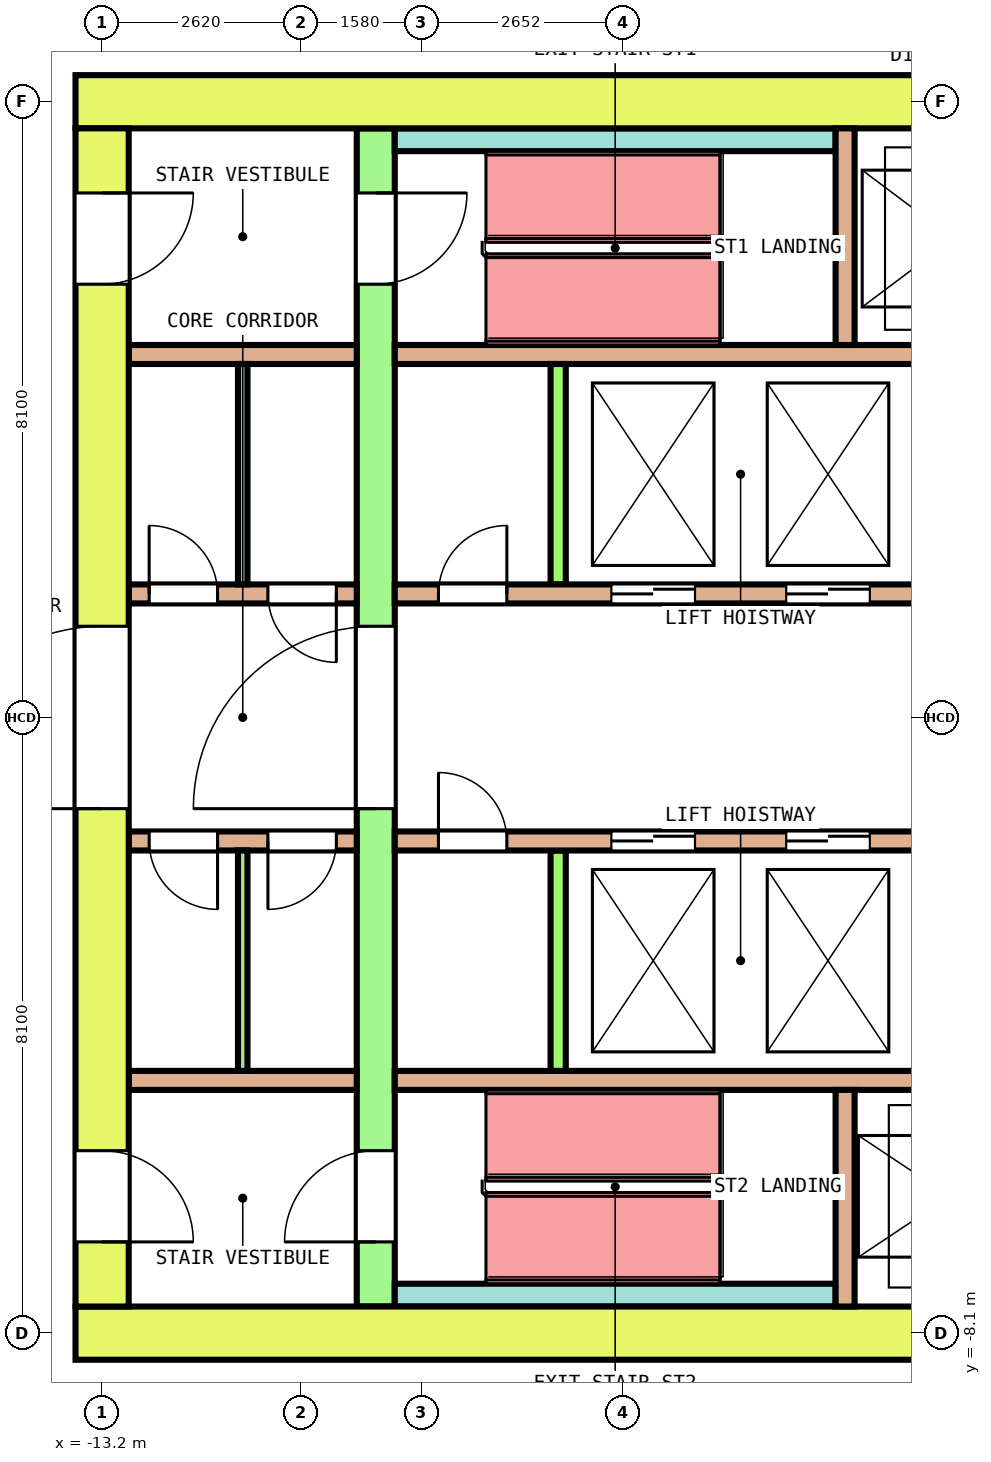
"""IFC4 building model, lengths in metres.
Left out: names, types, materials, properties, quantities, classifications, styles, units other than length and angle.
Written with IfcOpenShell. Run it as: python <this file> out.ifc"""

import sys

from ifc_helpers import new_model, si_unit, direction, frame, frame_2d, origin, place, context, subcontext, project, spatial, rectangle, extrude, element, fill, save


model = new_model("IFC4")
c1 = context("Model", 3, precision=1e-05, world=origin(), true_north=direction((0.0, 1.0)))
c2 = subcontext(c1, "Body", "Model", "MODEL_VIEW")
j1 = project(units=[si_unit("LENGTHUNIT", "METRE"), si_unit("PLANEANGLEUNIT", "RADIAN")], contexts=[c1])
p1 = place(None, origin())
s1 = spatial("IfcSite", under=j1, at=p1, CompositionType="ELEMENT")
p2 = place(p1, origin())
s2 = spatial("IfcBuilding", under=s1, at=p2, CompositionType="ELEMENT")
p3 = place(p2, frame((0.0, 0.0, 189.2)))
s3 = spatial("IfcBuildingStorey", under=s2, at=p3, CompositionType="ELEMENT", Elevation=189.2)
p4 = place(p3, frame((-13.55, 8.1, 0.0), z_axis=(0.0, 0.0, 1.0), x_axis=(1.0, 0.0, 0.0)))
e1 = element("IfcWall", 1, at=p4, inside=s3, PredefinedType="SHEAR", context=c2, shape_type="SweptSolid", body=[
    extrude(rectangle(XDim=27.1, YDim=0.7, at=frame_2d((13.55, 0.0))), origin(), (0.0, 0.0, 1.0), 4.1),
])
p5 = place(p4, frame((14.475, 0.0, 0.0)))
e2 = element("IfcOpeningElement", 2, at=p5, cuts=e1, PredefinedType="OPENING", context=c2, shape_type="SweptSolid", body=[
    extrude(rectangle(XDim=1.4, YDim=2.1, at=frame_2d((0.7, 1.05))), frame((0.0, 0.36, 0.0), z_axis=(0.0, -1.0, 0.0), x_axis=(1.0, 0.0, 0.0)), (0.0, 0.0, 1.0), 0.72),
])
p6 = place(p3, frame((-13.55, -8.1, 0.0), z_axis=(0.0, 0.0, 1.0), x_axis=(1.0, 0.0, 0.0)))
e3 = element("IfcWall", 3, at=p6, inside=s3, PredefinedType="SHEAR", context=c2, shape_type="SweptSolid", body=[
    extrude(rectangle(XDim=27.1, YDim=0.7, at=frame_2d((13.55, 0.0))), origin(), (0.0, 0.0, 1.0), 4.1),
])
p7 = place(p6, frame((15.1, 0.0, 0.0)))
e4 = element("IfcOpeningElement", 4, at=p7, cuts=e3, PredefinedType="OPENING", context=c2, shape_type="SweptSolid", body=[
    extrude(rectangle(XDim=1.2, YDim=2.1, at=frame_2d((0.6, 1.05))), frame((0.0, 0.36, 0.0), z_axis=(0.0, -1.0, 0.0), x_axis=(1.0, 0.0, 0.0)), (0.0, 0.0, 1.0), 0.72),
])
p8 = place(p3, frame((-13.2, -7.75, 0.0), z_axis=(0.0, 0.0, 1.0), x_axis=(0.0, 1.0, 0.0)))
e5 = element("IfcWall", 5, at=p8, inside=s3, PredefinedType="SHEAR", context=c2, shape_type="SweptSolid", body=[
    extrude(rectangle(XDim=15.5, YDim=0.7, at=frame_2d((7.75, 0.0))), origin(), (0.0, 0.0, 1.0), 4.1),
])
p9 = place(p8, frame((6.55, 0.0, 0.0)))
e6 = element("IfcOpeningElement", 6, at=p9, cuts=e5, PredefinedType="OPENING", context=c2, shape_type="SweptSolid", body=[
    extrude(rectangle(XDim=2.4, YDim=2.1, at=frame_2d((1.2, 1.05))), frame((0.0, 0.36, 0.0), z_axis=(0.0, -1.0, 0.0), x_axis=(1.0, 0.0, 0.0)), (0.0, 0.0, 1.0), 0.72),
])
p10 = place(p8, frame((13.45, 0.0, 0.0)))
e7 = element("IfcOpeningElement", 7, at=p10, cuts=e5, PredefinedType="OPENING", context=c2, shape_type="SweptSolid", body=[
    extrude(rectangle(XDim=1.2, YDim=2.1, at=frame_2d((0.6, 1.05))), frame((0.0, 0.36, 0.0), z_axis=(0.0, -1.0, 0.0), x_axis=(1.0, 0.0, 0.0)), (0.0, 0.0, 1.0), 0.72),
])
p11 = place(p8, frame((0.85, 0.0, 0.0)))
e8 = element("IfcOpeningElement", 8, at=p11, cuts=e5, PredefinedType="OPENING", context=c2, shape_type="SweptSolid", body=[
    extrude(rectangle(XDim=1.2, YDim=2.1, at=frame_2d((0.6, 1.05))), frame((0.0, 0.36, 0.0), z_axis=(0.0, -1.0, 0.0), x_axis=(1.0, 0.0, 0.0)), (0.0, 0.0, 1.0), 0.72),
])
p12 = place(p3, frame((-9.6, -7.75, 0.0), z_axis=(0.0, 0.0, 1.0), x_axis=(0.0, 1.0, 0.0)))
e9 = element("IfcWall", 9, at=p12, inside=s3, PredefinedType="SHEAR", context=c2, shape_type="SweptSolid", body=[
    extrude(rectangle(XDim=15.5, YDim=0.5, at=frame_2d((7.75, 0.0))), origin(), (0.0, 0.0, 1.0), 4.1),
])
p13 = place(p12, frame((6.55, 0.0, 0.0)))
e10 = element("IfcOpeningElement", 10, at=p13, cuts=e9, PredefinedType="OPENING", context=c2, shape_type="SweptSolid", body=[
    extrude(rectangle(XDim=2.4, YDim=2.1, at=frame_2d((1.2, 1.05))), frame((0.0, 0.26, 0.0), z_axis=(0.0, -1.0, 0.0), x_axis=(1.0, 0.0, 0.0)), (0.0, 0.0, 1.0), 0.52),
])
p14 = place(p12, frame((13.45, 0.0, 0.0)))
e11 = element("IfcOpeningElement", 11, at=p14, cuts=e9, PredefinedType="OPENING", context=c2, shape_type="SweptSolid", body=[
    extrude(rectangle(XDim=1.2, YDim=2.1, at=frame_2d((0.6, 1.05))), frame((0.0, 0.26, 0.0), z_axis=(0.0, -1.0, 0.0), x_axis=(1.0, 0.0, 0.0)), (0.0, 0.0, 1.0), 0.52),
])
p15 = place(p12, frame((0.85, 0.0, 0.0)))
e12 = element("IfcOpeningElement", 12, at=p15, cuts=e9, PredefinedType="OPENING", context=c2, shape_type="SweptSolid", body=[
    extrude(rectangle(XDim=1.2, YDim=2.1, at=frame_2d((0.6, 1.05))), frame((0.0, 0.26, 0.0), z_axis=(0.0, -1.0, 0.0), x_axis=(1.0, 0.0, 0.0)), (0.0, 0.0, 1.0), 0.52),
])
p16 = place(p3, frame((-12.85, 1.625, 0.0), z_axis=(0.0, 0.0, 1.0), x_axis=(1.0, 0.0, 0.0)))
e13 = element("IfcWall", 13, at=p16, inside=s3, PredefinedType="SOLIDWALL", context=c2, shape_type="SweptSolid", body=[
    extrude(rectangle(XDim=3.0, YDim=0.25, at=frame_2d((1.5, 0.0))), origin(), (0.0, 0.0, 1.0), 4.1),
])
p17 = place(p16, frame((0.269, 0.0, 0.0)))
e14 = element("IfcOpeningElement", 14, at=p17, cuts=e13, PredefinedType="OPENING", context=c2, shape_type="SweptSolid", body=[
    extrude(rectangle(XDim=0.9, YDim=2.1, at=frame_2d((0.45, 1.05))), frame((0.0, 0.135, 0.0), z_axis=(0.0, -1.0, 0.0), x_axis=(1.0, 0.0, 0.0)), (0.0, 0.0, 1.0), 0.27),
])
p18 = place(p16, frame((1.831, 0.0, 0.0)))
e15 = element("IfcOpeningElement", 15, at=p18, cuts=e13, PredefinedType="OPENING", context=c2, shape_type="SweptSolid", body=[
    extrude(rectangle(XDim=0.9, YDim=2.1, at=frame_2d((0.45, 1.05))), frame((0.0, 0.135, 0.0), z_axis=(0.0, -1.0, 0.0), x_axis=(1.0, 0.0, 0.0)), (0.0, 0.0, 1.0), 0.27),
])
p19 = place(p3, frame((-9.35, 1.625, 0.0), z_axis=(0.0, 0.0, 1.0), x_axis=(1.0, 0.0, 0.0)))
e16 = element("IfcWall", 16, at=p19, inside=s3, PredefinedType="SOLIDWALL", context=c2, shape_type="SweptSolid", body=[
    extrude(rectangle(XDim=18.7, YDim=0.25, at=frame_2d((9.35, 0.0))), origin(), (0.0, 0.0, 1.0), 4.1),
])
p20 = place(p19, frame((2.85, 0.0, 0.0)))
e17 = element("IfcOpeningElement", 17, at=p20, cuts=e16, PredefinedType="OPENING", context=c2, shape_type="SweptSolid", body=[
    extrude(rectangle(XDim=1.1, YDim=2.1, at=frame_2d((0.55, 1.05))), frame((0.0, 0.135, 0.0), z_axis=(0.0, -1.0, 0.0), x_axis=(1.0, 0.0, 0.0)), (0.0, 0.0, 1.0), 0.27),
])
p21 = place(p19, frame((5.15, 0.0, 0.0)))
e18 = element("IfcOpeningElement", 18, at=p21, cuts=e16, PredefinedType="OPENING", context=c2, shape_type="SweptSolid", body=[
    extrude(rectangle(XDim=1.1, YDim=2.1, at=frame_2d((0.55, 1.05))), frame((0.0, 0.135, 0.0), z_axis=(0.0, -1.0, 0.0), x_axis=(1.0, 0.0, 0.0)), (0.0, 0.0, 1.0), 0.27),
])
p22 = place(p19, frame((14.8, 0.0, 0.0)))
e19 = element("IfcOpeningElement", 19, at=p22, cuts=e16, PredefinedType="OPENING", context=c2, shape_type="SweptSolid", body=[
    extrude(rectangle(XDim=1.1, YDim=2.1, at=frame_2d((0.55, 1.05))), frame((0.0, 0.135, 0.0), z_axis=(0.0, -1.0, 0.0), x_axis=(1.0, 0.0, 0.0)), (0.0, 0.0, 1.0), 0.27),
])
p23 = place(p19, frame((0.575, 0.0, 0.0)))
e20 = element("IfcOpeningElement", 20, at=p23, cuts=e16, PredefinedType="OPENING", context=c2, shape_type="SweptSolid", body=[
    extrude(rectangle(XDim=0.9, YDim=2.1, at=frame_2d((0.45, 1.05))), frame((0.0, 0.135, 0.0), z_axis=(0.0, -1.0, 0.0), x_axis=(1.0, 0.0, 0.0)), (0.0, 0.0, 1.0), 0.27),
])
p24 = place(p19, frame((17.225, 0.0, 0.0)))
e21 = element("IfcOpeningElement", 21, at=p24, cuts=e16, PredefinedType="OPENING", context=c2, shape_type="SweptSolid", body=[
    extrude(rectangle(XDim=0.9, YDim=2.1, at=frame_2d((0.45, 1.05))), frame((0.0, 0.135, 0.0), z_axis=(0.0, -1.0, 0.0), x_axis=(1.0, 0.0, 0.0)), (0.0, 0.0, 1.0), 0.27),
])
p25 = place(p3, frame((-12.85, 4.775, 0.0), z_axis=(0.0, 0.0, 1.0), x_axis=(1.0, 0.0, 0.0)))
e22 = element("IfcWall", 22, at=p25, inside=s3, PredefinedType="SOLIDWALL", context=c2, shape_type="SweptSolid", body=[
    extrude(rectangle(XDim=3.0, YDim=0.25, at=frame_2d((1.5, 0.0))), origin(), (0.0, 0.0, 1.0), 4.1),
])
p26 = place(p3, frame((-9.35, 4.775, 0.0), z_axis=(0.0, 0.0, 1.0), x_axis=(1.0, 0.0, 0.0)))
e23 = element("IfcWall", 23, at=p26, inside=s3, PredefinedType="SOLIDWALL", context=c2, shape_type="SweptSolid", body=[
    extrude(rectangle(XDim=18.7, YDim=0.25, at=frame_2d((9.35, 0.0))), origin(), (0.0, 0.0, 1.0), 4.1),
])
p27 = place(p3, frame((-7.2, 1.75, 0.0), z_axis=(0.0, 0.0, 1.0), x_axis=(0.0, 1.0, 0.0)))
e24 = element("IfcWall", 24, at=p27, inside=s3, PredefinedType="SOLIDWALL", context=c2, shape_type="SweptSolid", body=[
    extrude(rectangle(XDim=2.9, YDim=0.2, at=frame_2d((1.45, 0.0))), origin(), (0.0, 0.0, 1.0), 4.1),
])
p28 = place(p3, frame((-12.85, -1.625, 0.0), z_axis=(0.0, 0.0, 1.0), x_axis=(1.0, 0.0, 0.0)))
e25 = element("IfcWall", 25, at=p28, inside=s3, PredefinedType="SOLIDWALL", context=c2, shape_type="SweptSolid", body=[
    extrude(rectangle(XDim=3.0, YDim=0.25, at=frame_2d((1.5, 0.0))), origin(), (0.0, 0.0, 1.0), 4.1),
])
p29 = place(p28, frame((0.269, 0.0, 0.0)))
e26 = element("IfcOpeningElement", 26, at=p29, cuts=e25, PredefinedType="OPENING", context=c2, shape_type="SweptSolid", body=[
    extrude(rectangle(XDim=0.9, YDim=2.1, at=frame_2d((0.45, 1.05))), frame((0.0, 0.135, 0.0), z_axis=(0.0, -1.0, 0.0), x_axis=(1.0, 0.0, 0.0)), (0.0, 0.0, 1.0), 0.27),
])
p30 = place(p28, frame((1.831, 0.0, 0.0)))
e27 = element("IfcOpeningElement", 27, at=p30, cuts=e25, PredefinedType="OPENING", context=c2, shape_type="SweptSolid", body=[
    extrude(rectangle(XDim=0.9, YDim=2.1, at=frame_2d((0.45, 1.05))), frame((0.0, 0.135, 0.0), z_axis=(0.0, -1.0, 0.0), x_axis=(1.0, 0.0, 0.0)), (0.0, 0.0, 1.0), 0.27),
])
p31 = place(p3, frame((-9.35, -1.625, 0.0), z_axis=(0.0, 0.0, 1.0), x_axis=(1.0, 0.0, 0.0)))
e28 = element("IfcWall", 28, at=p31, inside=s3, PredefinedType="SOLIDWALL", context=c2, shape_type="SweptSolid", body=[
    extrude(rectangle(XDim=18.7, YDim=0.25, at=frame_2d((9.35, 0.0))), origin(), (0.0, 0.0, 1.0), 4.1),
])
p32 = place(p31, frame((2.85, 0.0, 0.0)))
e29 = element("IfcOpeningElement", 29, at=p32, cuts=e28, PredefinedType="OPENING", context=c2, shape_type="SweptSolid", body=[
    extrude(rectangle(XDim=1.1, YDim=2.1, at=frame_2d((0.55, 1.05))), frame((0.0, 0.135, 0.0), z_axis=(0.0, -1.0, 0.0), x_axis=(1.0, 0.0, 0.0)), (0.0, 0.0, 1.0), 0.27),
])
p33 = place(p31, frame((5.15, 0.0, 0.0)))
e30 = element("IfcOpeningElement", 30, at=p33, cuts=e28, PredefinedType="OPENING", context=c2, shape_type="SweptSolid", body=[
    extrude(rectangle(XDim=1.1, YDim=2.1, at=frame_2d((0.55, 1.05))), frame((0.0, 0.135, 0.0), z_axis=(0.0, -1.0, 0.0), x_axis=(1.0, 0.0, 0.0)), (0.0, 0.0, 1.0), 0.27),
])
p34 = place(p31, frame((14.8, 0.0, 0.0)))
e31 = element("IfcOpeningElement", 31, at=p34, cuts=e28, PredefinedType="OPENING", context=c2, shape_type="SweptSolid", body=[
    extrude(rectangle(XDim=1.1, YDim=2.1, at=frame_2d((0.55, 1.05))), frame((0.0, 0.135, 0.0), z_axis=(0.0, -1.0, 0.0), x_axis=(1.0, 0.0, 0.0)), (0.0, 0.0, 1.0), 0.27),
])
p35 = place(p31, frame((0.575, 0.0, 0.0)))
e32 = element("IfcOpeningElement", 32, at=p35, cuts=e28, PredefinedType="OPENING", context=c2, shape_type="SweptSolid", body=[
    extrude(rectangle(XDim=0.9, YDim=2.1, at=frame_2d((0.45, 1.05))), frame((0.0, 0.135, 0.0), z_axis=(0.0, -1.0, 0.0), x_axis=(1.0, 0.0, 0.0)), (0.0, 0.0, 1.0), 0.27),
])
p36 = place(p31, frame((17.225, 0.0, 0.0)))
e33 = element("IfcOpeningElement", 33, at=p36, cuts=e28, PredefinedType="OPENING", context=c2, shape_type="SweptSolid", body=[
    extrude(rectangle(XDim=0.9, YDim=2.1, at=frame_2d((0.45, 1.05))), frame((0.0, 0.135, 0.0), z_axis=(0.0, -1.0, 0.0), x_axis=(1.0, 0.0, 0.0)), (0.0, 0.0, 1.0), 0.27),
])
p37 = place(p3, frame((-12.85, -4.775, 0.0), z_axis=(0.0, 0.0, 1.0), x_axis=(1.0, 0.0, 0.0)))
e34 = element("IfcWall", 34, at=p37, inside=s3, PredefinedType="SOLIDWALL", context=c2, shape_type="SweptSolid", body=[
    extrude(rectangle(XDim=3.0, YDim=0.25, at=frame_2d((1.5, 0.0))), origin(), (0.0, 0.0, 1.0), 4.1),
])
p38 = place(p3, frame((-9.35, -4.775, 0.0), z_axis=(0.0, 0.0, 1.0), x_axis=(1.0, 0.0, 0.0)))
e35 = element("IfcWall", 35, at=p38, inside=s3, PredefinedType="SOLIDWALL", context=c2, shape_type="SweptSolid", body=[
    extrude(rectangle(XDim=18.7, YDim=0.25, at=frame_2d((9.35, 0.0))), origin(), (0.0, 0.0, 1.0), 4.1),
])
p39 = place(p3, frame((-7.2, -4.65, 0.0), z_axis=(0.0, 0.0, 1.0), x_axis=(0.0, 1.0, 0.0)))
e36 = element("IfcWall", 36, at=p39, inside=s3, PredefinedType="SOLIDWALL", context=c2, shape_type="SweptSolid", body=[
    extrude(rectangle(XDim=2.9, YDim=0.2, at=frame_2d((1.45, 0.0))), origin(), (0.0, 0.0, 1.0), 4.1),
])
p40 = place(p3, frame((-9.35, 7.6, 0.0), z_axis=(0.0, 0.0, 1.0), x_axis=(1.0, 0.0, 0.0)))
e37 = element("IfcWall", 37, at=p40, inside=s3, PredefinedType="SOLIDWALL", context=c2, shape_type="SweptSolid", body=[
    extrude(rectangle(XDim=5.8, YDim=0.3, at=frame_2d((2.9, 0.0))), origin(), (0.0, 0.0, 1.0), 4.1),
])
p41 = place(p3, frame((-3.425, 4.9, 0.0), z_axis=(0.0, 0.0, 1.0), x_axis=(0.0, 1.0, 0.0)))
e38 = element("IfcWall", 38, at=p41, inside=s3, PredefinedType="SOLIDWALL", context=c2, shape_type="SweptSolid", body=[
    extrude(rectangle(XDim=2.85, YDim=0.25, at=frame_2d((1.425, 0.0))), origin(), (0.0, 0.0, 1.0), 4.1),
])
p42 = place(p3, frame((-9.35, -7.6, 0.0), z_axis=(0.0, 0.0, 1.0), x_axis=(1.0, 0.0, 0.0)))
e39 = element("IfcWall", 39, at=p42, inside=s3, PredefinedType="SOLIDWALL", context=c2, shape_type="SweptSolid", body=[
    extrude(rectangle(XDim=5.8, YDim=0.3, at=frame_2d((2.9, 0.0))), origin(), (0.0, 0.0, 1.0), 4.1),
])
p43 = place(p3, frame((-3.425, -7.75, 0.0), z_axis=(0.0, 0.0, 1.0), x_axis=(0.0, 1.0, 0.0)))
e40 = element("IfcWall", 40, at=p43, inside=s3, PredefinedType="SOLIDWALL", context=c2, shape_type="SweptSolid", body=[
    extrude(rectangle(XDim=2.85, YDim=0.25, at=frame_2d((1.425, 0.0))), origin(), (0.0, 0.0, 1.0), 4.1),
])
for number, where, z_axis, x_axis in (
    (41, (-11.35, 1.75, 0.0), (0.0, 0.0, 1.0), (0.0, 1.0, 0.0)),
    (42, (-11.35, -4.65, 0.0), (0.0, 0.0, 1.0), (0.0, 1.0, 0.0)),
):
    element("IfcWall", number, at=place(p3, frame(where, z_axis=z_axis, x_axis=x_axis)), inside=s3, PredefinedType="PARTITIONING", context=c2, shape_type="SweptSolid", body=[
        extrude(rectangle(XDim=2.9, YDim=0.125, at=frame_2d((1.45, 0.0))), origin(), (0.0, 0.0, 1.0), 4.1),
    ])
p44 = place(p20, origin())
e43 = element("IfcDoor", 43, at=p44, inside=s3, OperationType="DOUBLE_DOOR_SLIDING", PredefinedType="DOOR", context=c2, shape_type="SweptSolid", body=[
    extrude(rectangle(XDim=1.1, YDim=2.1, at=frame_2d((0.55, 1.05))), frame((0.0, 0.075, 0.0), z_axis=(0.0, -1.0, 0.0), x_axis=(1.0, 0.0, 0.0)), (0.0, 0.0, 1.0), 0.15),
])
fill(e17, e43)
p45 = place(p21, origin())
e44 = element("IfcDoor", 44, at=p45, inside=s3, OperationType="DOUBLE_DOOR_SLIDING", PredefinedType="DOOR", context=c2, shape_type="SweptSolid", body=[
    extrude(rectangle(XDim=1.1, YDim=2.1, at=frame_2d((0.55, 1.05))), frame((0.0, 0.075, 0.0), z_axis=(0.0, -1.0, 0.0), x_axis=(1.0, 0.0, 0.0)), (0.0, 0.0, 1.0), 0.15),
])
fill(e18, e44)
p46 = place(p32, origin())
e45 = element("IfcDoor", 45, at=p46, inside=s3, OperationType="DOUBLE_DOOR_SLIDING", PredefinedType="DOOR", context=c2, shape_type="SweptSolid", body=[
    extrude(rectangle(XDim=1.1, YDim=2.1, at=frame_2d((0.55, 1.05))), frame((0.0, 0.075, 0.0), z_axis=(0.0, -1.0, 0.0), x_axis=(1.0, 0.0, 0.0)), (0.0, 0.0, 1.0), 0.15),
])
fill(e29, e45)
p47 = place(p33, origin())
e46 = element("IfcDoor", 46, at=p47, inside=s3, OperationType="DOUBLE_DOOR_SLIDING", PredefinedType="DOOR", context=c2, shape_type="SweptSolid", body=[
    extrude(rectangle(XDim=1.1, YDim=2.1, at=frame_2d((0.55, 1.05))), frame((0.0, 0.075, 0.0), z_axis=(0.0, -1.0, 0.0), x_axis=(1.0, 0.0, 0.0)), (0.0, 0.0, 1.0), 0.15),
])
fill(e30, e46)
p48 = place(p13, origin())
e47 = element("IfcDoor", 47, at=p48, inside=s3, OperationType="DOUBLE_DOOR_SINGLE_SWING", PredefinedType="DOOR", context=c2, shape_type="SweptSolid", body=[
    extrude(rectangle(XDim=2.4, YDim=2.1, at=frame_2d((1.2, 1.05))), frame((0.0, 0.2, 0.0), z_axis=(0.0, -1.0, 0.0), x_axis=(1.0, 0.0, 0.0)), (0.0, 0.0, 1.0), 0.4),
])
fill(e10, e47)
p49 = place(p9, origin())
e48 = element("IfcDoor", 48, at=p49, inside=s3, OperationType="DOUBLE_DOOR_SINGLE_SWING", PredefinedType="DOOR", context=c2, shape_type="SweptSolid", body=[
    extrude(rectangle(XDim=2.4, YDim=2.1, at=frame_2d((1.2, 1.05))), frame((0.0, 0.3, 0.0), z_axis=(0.0, -1.0, 0.0), x_axis=(1.0, 0.0, 0.0)), (0.0, 0.0, 1.0), 0.6),
])
fill(e6, e48)
p50 = place(p14, origin())
e49 = element("IfcDoor", 49, at=p50, inside=s3, OperationType="SINGLE_SWING_RIGHT", PredefinedType="DOOR", context=c2, shape_type="SweptSolid", body=[
    extrude(rectangle(XDim=1.2, YDim=2.1, at=frame_2d((0.6, 1.05))), frame((0.0, 0.2, 0.0), z_axis=(0.0, -1.0, 0.0), x_axis=(1.0, 0.0, 0.0)), (0.0, 0.0, 1.0), 0.4),
])
fill(e11, e49)
p51 = place(p10, origin())
e50 = element("IfcDoor", 50, at=p51, inside=s3, OperationType="SINGLE_SWING_LEFT", PredefinedType="DOOR", context=c2, shape_type="SweptSolid", body=[
    extrude(rectangle(XDim=1.2, YDim=2.1, at=frame_2d((0.6, 1.05))), frame((0.0, 0.3, 0.0), z_axis=(0.0, -1.0, 0.0), x_axis=(1.0, 0.0, 0.0)), (0.0, 0.0, 1.0), 0.6),
])
fill(e7, e50)
p52 = place(p15, origin())
e51 = element("IfcDoor", 51, at=p52, inside=s3, OperationType="SINGLE_SWING_RIGHT", PredefinedType="DOOR", context=c2, shape_type="SweptSolid", body=[
    extrude(rectangle(XDim=1.2, YDim=2.1, at=frame_2d((0.6, 1.05))), frame((0.0, 0.2, 0.0), z_axis=(0.0, -1.0, 0.0), x_axis=(1.0, 0.0, 0.0)), (0.0, 0.0, 1.0), 0.4),
])
fill(e12, e51)
p53 = place(p11, origin())
e52 = element("IfcDoor", 52, at=p53, inside=s3, OperationType="SINGLE_SWING_LEFT", PredefinedType="DOOR", context=c2, shape_type="SweptSolid", body=[
    extrude(rectangle(XDim=1.2, YDim=2.1, at=frame_2d((0.6, 1.05))), frame((0.0, 0.3, 0.0), z_axis=(0.0, -1.0, 0.0), x_axis=(1.0, 0.0, 0.0)), (0.0, 0.0, 1.0), 0.6),
])
fill(e8, e52)
p54 = place(p17, origin())
e53 = element("IfcDoor", 53, at=p54, inside=s3, OperationType="SINGLE_SWING_LEFT", PredefinedType="DOOR", context=c2, shape_type="SweptSolid", body=[
    extrude(rectangle(XDim=0.9, YDim=2.1, at=frame_2d((0.45, 1.05))), frame((0.0, 0.075, 0.0), z_axis=(0.0, -1.0, 0.0), x_axis=(1.0, 0.0, 0.0)), (0.0, 0.0, 1.0), 0.15),
])
fill(e14, e53)
p55 = place(p18, origin())
e54 = element("IfcDoor", 54, at=p55, inside=s3, OperationType="SINGLE_SWING_RIGHT", PredefinedType="DOOR", context=c2, shape_type="SweptSolid", body=[
    extrude(rectangle(XDim=0.9, YDim=2.1, at=frame_2d((0.45, 1.05))), frame((0.0, 0.075, 0.0), z_axis=(0.0, -1.0, 0.0), x_axis=(1.0, 0.0, 0.0)), (0.0, 0.0, 1.0), 0.15),
])
fill(e15, e54)
p56 = place(p23, origin())
e55 = element("IfcDoor", 55, at=p56, inside=s3, OperationType="SINGLE_SWING_LEFT", PredefinedType="DOOR", context=c2, shape_type="SweptSolid", body=[
    extrude(rectangle(XDim=0.9, YDim=2.1, at=frame_2d((0.45, 1.05))), frame((0.0, 0.075, 0.0), z_axis=(0.0, -1.0, 0.0), x_axis=(1.0, 0.0, 0.0)), (0.0, 0.0, 1.0), 0.15),
])
fill(e20, e55)
p57 = place(p29, origin())
e56 = element("IfcDoor", 56, at=p57, inside=s3, OperationType="SINGLE_SWING_RIGHT", PredefinedType="DOOR", context=c2, shape_type="SweptSolid", body=[
    extrude(rectangle(XDim=0.9, YDim=2.1, at=frame_2d((0.45, 1.05))), frame((0.0, 0.075, 0.0), z_axis=(0.0, -1.0, 0.0), x_axis=(1.0, 0.0, 0.0)), (0.0, 0.0, 1.0), 0.15),
])
fill(e26, e56)
p58 = place(p30, origin())
e57 = element("IfcDoor", 57, at=p58, inside=s3, OperationType="SINGLE_SWING_LEFT", PredefinedType="DOOR", context=c2, shape_type="SweptSolid", body=[
    extrude(rectangle(XDim=0.9, YDim=2.1, at=frame_2d((0.45, 1.05))), frame((0.0, 0.075, 0.0), z_axis=(0.0, -1.0, 0.0), x_axis=(1.0, 0.0, 0.0)), (0.0, 0.0, 1.0), 0.15),
])
fill(e27, e57)
p59 = place(p35, origin())
e58 = element("IfcDoor", 58, at=p59, inside=s3, OperationType="SINGLE_SWING_RIGHT", PredefinedType="DOOR", context=c2, shape_type="SweptSolid", body=[
    extrude(rectangle(XDim=0.9, YDim=2.1, at=frame_2d((0.45, 1.05))), frame((0.0, 0.075, 0.0), z_axis=(0.0, -1.0, 0.0), x_axis=(1.0, 0.0, 0.0)), (0.0, 0.0, 1.0), 0.15),
])
fill(e32, e58)
save(model, sys.argv[1])
